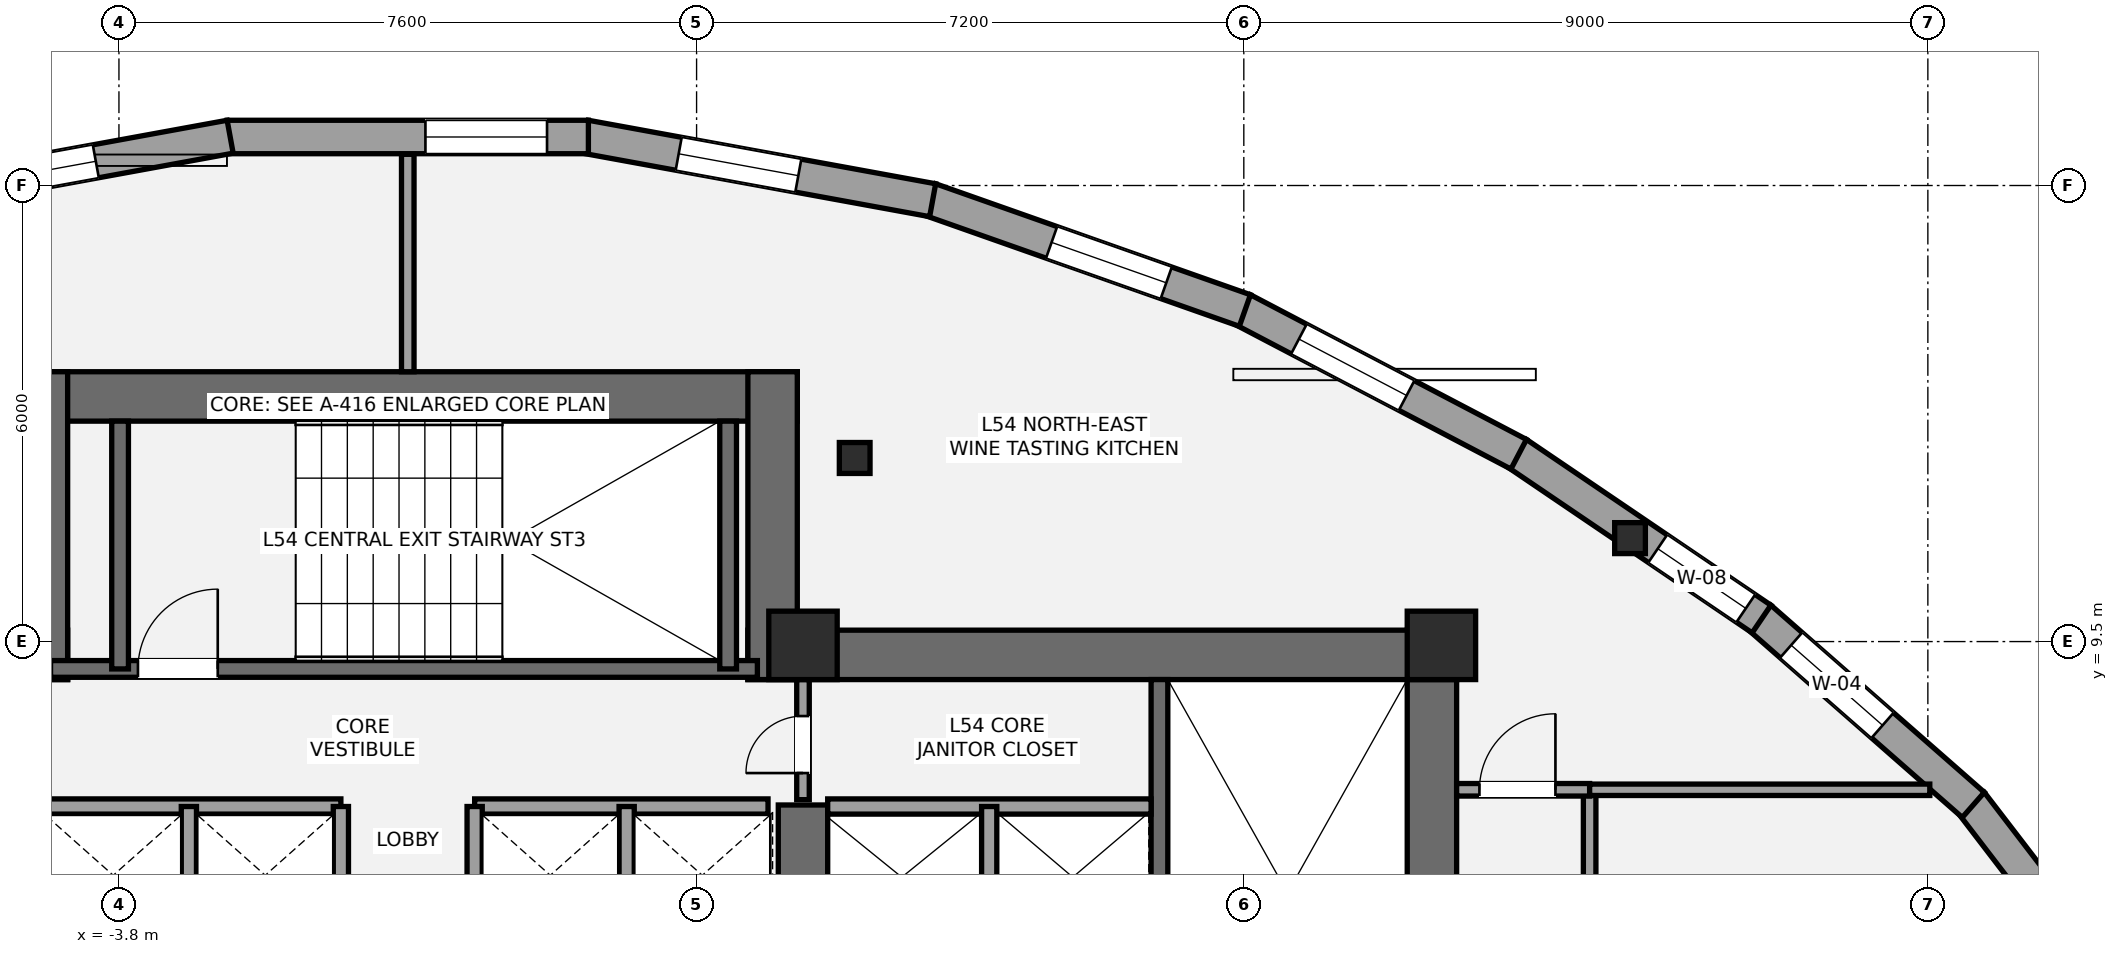
"""IFC4 building model, lengths in metres.
Left out: names, types, materials, properties, quantities, classifications, styles, units other than length and angle.
Written with IfcOpenShell. Run it as: python <this file> out.ifc"""

import sys

from ifc_helpers import new_model, si_unit, direction, frame, frame_2d, origin, origin_2d, place, context, subcontext, project, spatial, rectangle, i_section, extrude, element, fill, save


model = new_model("IFC4")
c1 = context("Model", 3, precision=1e-05, world=origin(), true_north=direction((0.0, 1.0)))
c2 = subcontext(c1, "Body", "Model", "MODEL_VIEW")
j1 = project(units=[si_unit("LENGTHUNIT", "METRE"), si_unit("PLANEANGLEUNIT", "RADIAN")], contexts=[c1])
p1 = place(None, origin())
s1 = spatial("IfcSite", under=j1, at=p1, CompositionType="ELEMENT")
p2 = place(p1, origin())
s2 = spatial("IfcBuilding", under=s1, at=p2, CompositionType="ELEMENT")
p3 = place(p2, frame((0.0, 0.0, 195.0)))
s3 = spatial("IfcBuildingStorey", under=s2, at=p3, CompositionType="ELEMENT", Elevation=195.0)
p4 = place(p3, frame((-13.8, 9.325, 0.0), z_axis=(0.0, 0.0, 1.0), x_axis=(1.0, 0.0, 0.0)))
e1 = element("IfcWall", 1, at=p4, inside=s3, PredefinedType="SHEAR", context=c2, shape_type="SweptSolid", body=[
    extrude(rectangle(XDim=9.325, YDim=0.65, at=frame_2d((4.663, 0.0))), origin(), (0.0, 0.0, 1.0), 3.2),
])
p5 = place(p3, frame((13.475, 1.2, 0.0), z_axis=(0.0, 0.0, 1.0), x_axis=(0.0, 1.0, 0.0)))
e2 = element("IfcWall", 2, at=p5, inside=s3, PredefinedType="SHEAR", context=c2, shape_type="SweptSolid", body=[
    extrude(rectangle(XDim=8.45, YDim=0.65, at=frame_2d((4.225, 0.0))), origin(), (0.0, 0.0, 1.0), 3.2),
])
p6 = place(p3, frame((4.475, 9.325, 0.0), z_axis=(0.0, 0.0, 1.0), x_axis=(1.0, 0.0, 0.0)))
e3 = element("IfcWall", 3, at=p6, inside=s3, PredefinedType="SHEAR", context=c2, shape_type="SweptSolid", body=[
    extrude(rectangle(XDim=9.325, YDim=0.65, at=frame_2d((4.663, 0.0))), origin(), (0.0, 0.0, 1.0), 3.2),
])
p7 = place(p3, frame((5.2, 5.35, 0.0), z_axis=(0.0, 0.0, 1.0), x_axis=(0.0, 1.0, 0.0)))
e4 = element("IfcWall", 4, at=p7, inside=s3, PredefinedType="SHEAR", context=c2, shape_type="SweptSolid", body=[
    extrude(rectangle(XDim=2.0, YDim=0.65, at=frame_2d((1.0, 0.0))), origin(), (0.0, 0.0, 1.0), 3.2),
])
p8 = place(p3, frame((9.89, 1.85, 0.0), z_axis=(0.0, 0.0, 1.0), x_axis=(0.0, 1.0, 0.0)))
e5 = element("IfcWall", 5, at=p8, inside=s3, PredefinedType="SHEAR", context=c2, shape_type="SweptSolid", body=[
    extrude(rectangle(XDim=7.15, YDim=0.22, at=frame_2d((3.575, 0.0))), origin(), (0.0, 0.0, 1.0), 3.2),
])
p9 = place(p3, frame((-5.125, 12.725, 0.0), z_axis=(0.0, 0.0, 1.0), x_axis=(1.0, 0.0, 0.0)))
e6 = element("IfcWall", 6, at=p9, inside=s3, PredefinedType="SHEAR", context=c2, shape_type="SweptSolid", body=[
    extrude(rectangle(XDim=10.25, YDim=0.65, at=frame_2d((5.125, 0.0))), origin(), (0.0, 0.0, 1.0), 3.2),
])
for number, where, z_axis, x_axis in (
    (7, (-4.8, 9.0, 0.0), (0.0, 0.0, 1.0), (0.0, 1.0, 0.0)),
    (8, (4.8, 9.0, 0.0), (0.0, 0.0, 1.0), (0.0, 1.0, 0.0)),
):
    element("IfcWall", number, at=place(p3, frame(where, z_axis=z_axis, x_axis=x_axis)), inside=s3, PredefinedType="SHEAR", context=c2, shape_type="SweptSolid", body=[
        extrude(rectangle(XDim=4.05, YDim=0.65, at=frame_2d((2.025, 0.0))), origin(), (0.0, 0.0, 1.0), 3.2),
    ])
p10 = place(p3, frame((-4.7, 9.14, 0.0), z_axis=(0.0, 0.0, 1.0), x_axis=(1.0, 0.0, 0.0)))
e9 = element("IfcWall", 9, at=p10, inside=s3, PredefinedType="SHEAR", context=c2, shape_type="SweptSolid", body=[
    extrude(rectangle(XDim=9.3, YDim=0.22, at=frame_2d((4.65, 0.0))), origin(), (0.0, 0.0, 1.0), 3.2),
])
p11 = place(p10, frame((1.15, 0.0, 0.0)))
e10 = element("IfcOpeningElement", 10, at=p11, cuts=e9, PredefinedType="OPENING", context=c2, shape_type="SweptSolid", body=[
    extrude(rectangle(XDim=1.05, YDim=2.15, at=frame_2d((0.525, 1.075))), frame((0.0, 0.12, 0.0), z_axis=(0.0, -1.0, 0.0), x_axis=(1.0, 0.0, 0.0)), (0.0, 0.0, 1.0), 0.24),
])
for number, where, z_axis, x_axis in (
    (11, (-3.785, 9.14, 0.0), (0.0, 0.0, 1.0), (0.0, 1.0, 0.0)),
    (12, (4.215, 9.14, 0.0), (0.0, 0.0, 1.0), (0.0, 1.0, 0.0)),
):
    element("IfcWall", number, at=place(p3, frame(where, z_axis=z_axis, x_axis=x_axis)), inside=s3, PredefinedType="SHEAR", context=c2, shape_type="SweptSolid", body=[
        extrude(rectangle(XDim=3.26, YDim=0.22, at=frame_2d((1.63, 0.0))), origin(), (0.0, 0.0, 1.0), 3.2),
    ])
for number, where, z_axis, x_axis in (
    (13, (5.2, 9.45, 0.0), (0.0, 0.0, 1.0), (1.0, 0.0, 0.0)),
    (14, (13.6, 9.45, 0.0), (0.0, 0.0, 1.0), (1.0, 0.0, 0.0)),
):
    element("IfcColumn", number, at=place(p3, frame(where, z_axis=z_axis, x_axis=x_axis)), inside=s3, PredefinedType="COLUMN", context=c2, shape_type="SweptSolid", body=[
        extrude(rectangle(XDim=0.9, YDim=0.9, at=origin_2d()), origin(), (0.0, 0.0, 1.0), 3.2),
    ])
for number, where, z_axis, x_axis in (
    (15, (16.082, 10.861, 0.0), (0.0, 0.0, 1.0), (1.0, 0.0, 0.0)),
    (16, (5.88, 11.915, 0.0), (0.0, 0.0, 1.0), (1.0, 0.0, 0.0)),
):
    element("IfcColumn", number, at=place(p3, frame(where, z_axis=z_axis, x_axis=x_axis)), inside=s3, PredefinedType="COLUMN", context=c2, shape_type="SweptSolid", body=[
        extrude(i_section(OverallWidth=0.404, OverallDepth=0.407, WebThickness=0.027, FlangeThickness=0.044, at=origin_2d()), origin(), (0.0, 0.0, 1.0), 3.2),
    ])
p12 = place(p3, frame((20.568, 7.383, 0.0), z_axis=(0.0, 0.0, 1.0), x_axis=(0.608586512644, -0.793487527708, 0.0)))
e17 = element("IfcWall", 17, at=p12, inside=s3, PredefinedType="STANDARD", context=c2, shape_type="SweptSolid", body=[
    extrude(rectangle(XDim=3.539, YDim=0.44, at=frame_2d((1.769, 0.0))), origin(), (0.0, 0.0, 1.0), 2.315),
])
p13 = place(p12, frame((1.441, 0.0, 0.58)))
e18 = element("IfcOpeningElement", 18, at=p13, cuts=e17, PredefinedType="OPENING", context=c2, shape_type="SweptSolid", body=[
    extrude(rectangle(XDim=1.6, YDim=1.55, at=frame_2d((0.8, 0.775))), frame((0.0, 0.23, 0.0), z_axis=(0.0, -1.0, 0.0), x_axis=(1.0, 0.0, 0.0)), (0.0, 0.0, 1.0), 0.46),
])
p14 = place(p3, frame((17.79, 9.813, 0.0), z_axis=(0.0, 0.0, 1.0), x_axis=(0.751936480142, -0.65923556475, 0.0)))
e19 = element("IfcWall", 19, at=p14, inside=s3, PredefinedType="STANDARD", context=c2, shape_type="SweptSolid", body=[
    extrude(rectangle(XDim=3.735, YDim=0.44, at=frame_2d((1.867, 0.0))), origin(), (0.0, 0.0, 1.0), 2.315),
])
p15 = place(p14, frame((0.547, 0.0, 0.58)))
e20 = element("IfcOpeningElement", 20, at=p15, cuts=e19, PredefinedType="OPENING", context=c2, shape_type="SweptSolid", body=[
    extrude(rectangle(XDim=1.6, YDim=1.55, at=frame_2d((0.8, 0.775))), frame((0.0, 0.23, 0.0), z_axis=(0.0, -1.0, 0.0), x_axis=(1.0, 0.0, 0.0)), (0.0, 0.0, 1.0), 0.46),
])
p16 = place(p3, frame((14.595, 11.977, 0.0), z_axis=(0.0, 0.0, 1.0), x_axis=(0.827704046296, -0.561164870377, 0.0)))
e21 = element("IfcWall", 21, at=p16, inside=s3, PredefinedType="STANDARD", context=c2, shape_type="SweptSolid", body=[
    extrude(rectangle(XDim=3.885, YDim=0.44, at=frame_2d((1.943, 0.0))), origin(), (0.0, 0.0, 1.0), 2.315),
])
p17 = place(p16, frame((2.236, 0.0, 0.58)))
e22 = element("IfcOpeningElement", 22, at=p17, cuts=e21, PredefinedType="OPENING", context=c2, shape_type="SweptSolid", body=[
    extrude(rectangle(XDim=1.4, YDim=1.55, at=frame_2d((0.7, 0.775))), frame((0.0, 0.23, 0.0), z_axis=(0.0, -1.0, 0.0), x_axis=(1.0, 0.0, 0.0)), (0.0, 0.0, 1.0), 0.46),
])
p18 = place(p3, frame((10.985, 13.868, 0.0), z_axis=(0.0, 0.0, 1.0), x_axis=(0.885676487837, -0.464302874094, 0.0)))
e23 = element("IfcWall", 23, at=p18, inside=s3, PredefinedType="STANDARD", context=c2, shape_type="SweptSolid", body=[
    extrude(rectangle(XDim=4.1, YDim=0.44, at=frame_2d((2.05, 0.0))), origin(), (0.0, 0.0, 1.0), 2.315),
])
p19 = place(p18, frame((0.835, 0.0, 0.58)))
e24 = element("IfcOpeningElement", 24, at=p19, cuts=e23, PredefinedType="OPENING", context=c2, shape_type="SweptSolid", body=[
    extrude(rectangle(XDim=1.6, YDim=1.55, at=frame_2d((0.8, 0.775))), frame((0.0, 0.23, 0.0), z_axis=(0.0, -1.0, 0.0), x_axis=(1.0, 0.0, 0.0)), (0.0, 0.0, 1.0), 0.46),
])
p20 = place(p3, frame((6.873, 15.315, 0.0), z_axis=(0.0, 0.0, 1.0), x_axis=(0.943100102185, -0.332508943125, 0.0)))
e25 = element("IfcWall", 25, at=p20, inside=s3, PredefinedType="STANDARD", context=c2, shape_type="SweptSolid", body=[
    extrude(rectangle(XDim=4.391, YDim=0.44, at=frame_2d((2.196, 0.0))), origin(), (0.0, 0.0, 1.0), 2.315),
])
p21 = place(p20, frame((1.695, 0.0, 0.58)))
e26 = element("IfcOpeningElement", 26, at=p21, cuts=e25, PredefinedType="OPENING", context=c2, shape_type="SweptSolid", body=[
    extrude(rectangle(XDim=1.6, YDim=1.55, at=frame_2d((0.8, 0.775))), frame((0.0, 0.23, 0.0), z_axis=(0.0, -1.0, 0.0), x_axis=(1.0, 0.0, 0.0)), (0.0, 0.0, 1.0), 0.46),
])
p22 = place(p3, frame((2.337, 16.142, 0.0), z_axis=(0.0, 0.0, 1.0), x_axis=(0.983691132349, -0.179865939348, 0.0)))
e27 = element("IfcWall", 27, at=p22, inside=s3, PredefinedType="STANDARD", context=c2, shape_type="SweptSolid", body=[
    extrude(rectangle(XDim=4.645, YDim=0.44, at=frame_2d((2.322, 0.0))), origin(), (0.0, 0.0, 1.0), 2.315),
])
p23 = place(p22, frame((1.248, 0.0, 0.58)))
e28 = element("IfcOpeningElement", 28, at=p23, cuts=e27, PredefinedType="OPENING", context=c2, shape_type="SweptSolid", body=[
    extrude(rectangle(XDim=1.6, YDim=1.55, at=frame_2d((0.8, 0.775))), frame((0.0, 0.23, 0.0), z_axis=(0.0, -1.0, 0.0), x_axis=(1.0, 0.0, 0.0)), (0.0, 0.0, 1.0), 0.46),
])
p24 = place(p3, frame((-2.376, 16.138, 0.0), z_axis=(0.0, 0.0, 1.0), x_axis=(1.0, 0.0, 0.0)))
e29 = element("IfcWall", 29, at=p24, inside=s3, PredefinedType="STANDARD", context=c2, shape_type="SweptSolid", body=[
    extrude(rectangle(XDim=4.753, YDim=0.44, at=frame_2d((2.376, 0.0))), origin(), (0.0, 0.0, 1.0), 2.315),
])
p25 = place(p24, frame((2.609, 0.0, 0.58)))
e30 = element("IfcOpeningElement", 30, at=p25, cuts=e29, PredefinedType="OPENING", context=c2, shape_type="SweptSolid", body=[
    extrude(rectangle(XDim=1.6, YDim=1.55, at=frame_2d((0.8, 0.775))), frame((0.0, 0.23, 0.0), z_axis=(0.0, -1.0, 0.0), x_axis=(1.0, 0.0, 0.0)), (0.0, 0.0, 1.0), 0.46),
])
p26 = place(p3, frame((-6.906, 15.306, 0.0), z_axis=(0.0, 0.0, 1.0), x_axis=(0.983691132349, 0.179865939348, 0.0)))
e31 = element("IfcWall", 31, at=p26, inside=s3, PredefinedType="STANDARD", context=c2, shape_type="SweptSolid", body=[
    extrude(rectangle(XDim=4.645, YDim=0.44, at=frame_2d((2.322, 0.0))), origin(), (0.0, 0.0, 1.0), 2.315),
])
p27 = place(p26, frame((1.248, 0.0, 0.58)))
e32 = element("IfcOpeningElement", 32, at=p27, cuts=e31, PredefinedType="OPENING", context=c2, shape_type="SweptSolid", body=[
    extrude(rectangle(XDim=1.6, YDim=1.55, at=frame_2d((0.8, 0.775))), frame((0.0, 0.23, 0.0), z_axis=(0.0, -1.0, 0.0), x_axis=(1.0, 0.0, 0.0)), (0.0, 0.0, 1.0), 0.46),
])
p28 = place(p3, frame((5.525, 7.33, 0.0), z_axis=(0.0, 0.0, 1.0), x_axis=(1.0, 0.0, 0.0)))
e33 = element("IfcWall", 33, at=p28, inside=s3, PredefinedType="SOLIDWALL", context=c2, shape_type="SweptSolid", body=[
    extrude(rectangle(XDim=4.255, YDim=0.2, at=frame_2d((2.127, 0.0))), origin(), (0.0, 0.0, 1.0), 3.02),
])
p29 = place(p3, frame((7.65, 5.47, 0.0), z_axis=(0.0, 0.0, 1.0), x_axis=(0.0, 1.0, 0.0)))
e34 = element("IfcWall", 34, at=p29, inside=s3, PredefinedType="SOLIDWALL", context=c2, shape_type="SweptSolid", body=[
    extrude(rectangle(XDim=1.86, YDim=0.2, at=frame_2d((0.93, 0.0))), origin(), (0.0, 0.0, 1.0), 3.02),
])
for number, where, z_axis, x_axis in (
    (35, (-4.74, 7.33, 0.0), (0.0, 0.0, 1.0), (1.0, 0.0, 0.0)),
    (36, (0.88, 7.33, 0.0), (0.0, 0.0, 1.0), (1.0, 0.0, 0.0)),
):
    element("IfcWall", number, at=place(p3, frame(where, z_axis=z_axis, x_axis=x_axis)), inside=s3, PredefinedType="SOLIDWALL", context=c2, shape_type="SweptSolid", body=[
        extrude(rectangle(XDim=3.86, YDim=0.2, at=frame_2d((1.93, 0.0))), origin(), (0.0, 0.0, 1.0), 3.02),
    ])
for number, where, z_axis, x_axis in (
    (37, (-2.88, 5.52, 0.0), (0.0, 0.0, 1.0), (0.0, 1.0, 0.0)),
    (38, (2.88, 5.52, 0.0), (0.0, 0.0, 1.0), (0.0, 1.0, 0.0)),
    (39, (-0.88, 5.52, 0.0), (0.0, 0.0, 1.0), (0.0, 1.0, 0.0)),
    (40, (0.88, 5.52, 0.0), (0.0, 0.0, 1.0), (0.0, 1.0, 0.0)),
):
    element("IfcWall", number, at=place(p3, frame(where, z_axis=z_axis, x_axis=x_axis)), inside=s3, PredefinedType="SOLIDWALL", context=c2, shape_type="SweptSolid", body=[
        extrude(rectangle(XDim=1.81, YDim=0.2, at=frame_2d((0.905, 0.0))), origin(), (0.0, 0.0, 1.0), 3.02),
    ])
p30 = place(p3, frame((5.2, 7.42, 0.0), z_axis=(0.0, 0.0, 1.0), x_axis=(0.0, 1.0, 0.0)))
e41 = element("IfcWall", 41, at=p30, inside=s3, PredefinedType="PARTITIONING", context=c2, shape_type="SweptSolid", body=[
    extrude(rectangle(XDim=1.58, YDim=0.165, at=frame_2d((0.79, 0.0))), origin(), (0.0, 0.0, 1.0), 3.02),
])
p31 = place(p30, frame((0.35, 0.0, 0.0)))
e42 = element("IfcOpeningElement", 42, at=p31, cuts=e41, PredefinedType="OPENING", context=c2, shape_type="SweptSolid", body=[
    extrude(rectangle(XDim=0.75, YDim=2.1, at=frame_2d((0.375, 1.05))), frame((0.0, 0.093, 0.0), z_axis=(0.0, -1.0, 0.0), x_axis=(1.0, 0.0, 0.0)), (0.0, 0.0, 1.0), 0.185),
])
p32 = place(p3, frame((15.55, -11.054, 0.0), z_axis=(0.0, 0.0, 1.0), x_axis=(0.0, 1.0, 0.0)))
e43 = element("IfcWall", 43, at=p32, inside=s3, PredefinedType="PARTITIONING", context=c2, shape_type="SweptSolid", body=[
    extrude(rectangle(XDim=18.604, YDim=0.165, at=frame_2d((9.302, 0.0))), origin(), (0.0, 0.0, 1.0), 2.473),
])
p33 = place(p32, frame((2.104, 0.0, 0.0)))
e44 = element("IfcOpeningElement", 44, at=p33, cuts=e43, PredefinedType="OPENING", context=c2, shape_type="SweptSolid", body=[
    extrude(rectangle(XDim=0.85, YDim=2.1, at=frame_2d((0.425, 1.05))), frame((0.0, 0.093, 0.0), z_axis=(0.0, -1.0, 0.0), x_axis=(1.0, 0.0, 0.0)), (0.0, 0.0, 1.0), 0.185),
])
p34 = place(p32, frame((5.314, 0.0, 0.0)))
e45 = element("IfcOpeningElement", 45, at=p34, cuts=e43, PredefinedType="OPENING", context=c2, shape_type="SweptSolid", body=[
    extrude(rectangle(XDim=1.0, YDim=2.15, at=frame_2d((0.5, 1.075))), frame((0.0, 0.093, 0.0), z_axis=(0.0, -1.0, 0.0), x_axis=(1.0, 0.0, 0.0)), (0.0, 0.0, 1.0), 0.185),
])
p35 = place(p32, frame((11.455, 0.0, 0.0)))
e46 = element("IfcOpeningElement", 46, at=p35, cuts=e43, PredefinedType="OPENING", context=c2, shape_type="SweptSolid", body=[
    extrude(rectangle(XDim=1.0, YDim=2.15, at=frame_2d((0.5, 1.075))), frame((0.0, 0.093, 0.0), z_axis=(0.0, -1.0, 0.0), x_axis=(1.0, 0.0, 0.0)), (0.0, 0.0, 1.0), 0.185),
])
p36 = place(p32, frame((15.83, 0.0, 0.0)))
e47 = element("IfcOpeningElement", 47, at=p36, cuts=e43, PredefinedType="OPENING", context=c2, shape_type="SweptSolid", body=[
    extrude(rectangle(XDim=1.0, YDim=2.15, at=frame_2d((0.5, 1.075))), frame((0.0, 0.093, 0.0), z_axis=(0.0, -1.0, 0.0), x_axis=(1.0, 0.0, 0.0)), (0.0, 0.0, 1.0), 0.185),
])
p37 = place(p3, frame((13.8, 7.55, 0.0), z_axis=(0.0, 0.0, 1.0), x_axis=(1.0, 0.0, 0.0)))
e48 = element("IfcWall", 48, at=p37, inside=s3, PredefinedType="PARTITIONING", context=c2, shape_type="SweptSolid", body=[
    extrude(rectangle(XDim=1.75, YDim=0.165, at=frame_2d((0.875, 0.0))), origin(), (0.0, 0.0, 1.0), 3.02),
])
p38 = place(p37, frame((0.3, 0.0, 0.0)))
e49 = element("IfcOpeningElement", 49, at=p38, cuts=e48, PredefinedType="OPENING", context=c2, shape_type="SweptSolid", body=[
    extrude(rectangle(XDim=1.0, YDim=2.15, at=frame_2d((0.5, 1.075))), frame((0.0, 0.093, 0.0), z_axis=(0.0, -1.0, 0.0), x_axis=(1.0, 0.0, 0.0)), (0.0, 0.0, 1.0), 0.185),
])
p39 = place(p3, frame((15.55, 7.55, 0.0), z_axis=(0.0, 0.0, 1.0), x_axis=(1.0, 0.0, 0.0)))
e50 = element("IfcWall", 50, at=p39, inside=s3, PredefinedType="PLUMBINGWALL", context=c2, shape_type="SweptSolid", body=[
    extrude(rectangle(XDim=4.475, YDim=0.15, at=frame_2d((2.238, 0.0))), origin(), (0.0, 0.0, 1.0), 2.473),
])
p40 = place(p3, frame((0.0, 13.05, 0.0), z_axis=(0.0, 0.0, 1.0), x_axis=(0.0, 1.0, 0.0)))
e51 = element("IfcWall", 51, at=p40, inside=s3, PredefinedType="PARTITIONING", context=c2, shape_type="SweptSolid", body=[
    extrude(rectangle(XDim=2.86, YDim=0.165, at=frame_2d((1.43, 0.0))), origin(), (0.0, 0.0, 1.0), 3.02),
])
p41 = place(p15, origin())
e52 = element("IfcWindow", 52, at=p41, inside=s3, PartitioningType="SINGLE_PANEL", PredefinedType="WINDOW", context=c2, shape_type="SweptSolid", body=[
    extrude(rectangle(XDim=1.6, YDim=1.55, at=frame_2d((0.8, 0.775))), frame((0.0, -0.01, 0.0), z_axis=(0.0, -1.0, 0.0), x_axis=(1.0, 0.0, 0.0)), (0.0, 0.0, 1.0), 0.06),
])
fill(e20, e52)
p42 = place(p17, origin())
e53 = element("IfcWindow", 53, at=p42, inside=s3, PartitioningType="SINGLE_PANEL", PredefinedType="WINDOW", context=c2, shape_type="SweptSolid", body=[
    extrude(rectangle(XDim=1.4, YDim=1.55, at=frame_2d((0.7, 0.775))), frame((0.0, -0.01, 0.0), z_axis=(0.0, -1.0, 0.0), x_axis=(1.0, 0.0, 0.0)), (0.0, 0.0, 1.0), 0.06),
])
fill(e22, e53)
p43 = place(p19, origin())
e54 = element("IfcWindow", 54, at=p43, inside=s3, PartitioningType="SINGLE_PANEL", PredefinedType="WINDOW", context=c2, shape_type="SweptSolid", body=[
    extrude(rectangle(XDim=1.6, YDim=1.55, at=frame_2d((0.8, 0.775))), frame((0.0, -0.01, 0.0), z_axis=(0.0, -1.0, 0.0), x_axis=(1.0, 0.0, 0.0)), (0.0, 0.0, 1.0), 0.06),
])
fill(e24, e54)
p44 = place(p21, origin())
e55 = element("IfcWindow", 55, at=p44, inside=s3, PartitioningType="SINGLE_PANEL", PredefinedType="WINDOW", context=c2, shape_type="SweptSolid", body=[
    extrude(rectangle(XDim=1.6, YDim=1.55, at=frame_2d((0.8, 0.775))), frame((0.0, -0.01, 0.0), z_axis=(0.0, -1.0, 0.0), x_axis=(1.0, 0.0, 0.0)), (0.0, 0.0, 1.0), 0.06),
])
fill(e26, e55)
p45 = place(p23, origin())
e56 = element("IfcWindow", 56, at=p45, inside=s3, PartitioningType="SINGLE_PANEL", PredefinedType="WINDOW", context=c2, shape_type="SweptSolid", body=[
    extrude(rectangle(XDim=1.6, YDim=1.55, at=frame_2d((0.8, 0.775))), frame((0.0, -0.01, 0.0), z_axis=(0.0, -1.0, 0.0), x_axis=(1.0, 0.0, 0.0)), (0.0, 0.0, 1.0), 0.06),
])
fill(e28, e56)
p46 = place(p25, origin())
e57 = element("IfcWindow", 57, at=p46, inside=s3, PartitioningType="SINGLE_PANEL", PredefinedType="WINDOW", context=c2, shape_type="SweptSolid", body=[
    extrude(rectangle(XDim=1.6, YDim=1.55, at=frame_2d((0.8, 0.775))), frame((0.0, -0.01, 0.0), z_axis=(0.0, -1.0, 0.0), x_axis=(1.0, 0.0, 0.0)), (0.0, 0.0, 1.0), 0.06),
])
fill(e30, e57)
p47 = place(p27, origin())
e58 = element("IfcWindow", 58, at=p47, inside=s3, PartitioningType="SINGLE_PANEL", PredefinedType="WINDOW", context=c2, shape_type="SweptSolid", body=[
    extrude(rectangle(XDim=1.6, YDim=1.55, at=frame_2d((0.8, 0.775))), frame((0.0, -0.01, 0.0), z_axis=(0.0, -1.0, 0.0), x_axis=(1.0, 0.0, 0.0)), (0.0, 0.0, 1.0), 0.06),
])
fill(e32, e58)
p48 = place(p11, origin())
e59 = element("IfcDoor", 59, at=p48, inside=s3, OperationType="SINGLE_SWING_RIGHT", PredefinedType="DOOR", context=c2, shape_type="SweptSolid", body=[
    extrude(rectangle(XDim=1.05, YDim=2.15, at=frame_2d((0.525, 1.075))), frame((0.0, 0.025, 0.0), z_axis=(0.0, -1.0, 0.0), x_axis=(1.0, 0.0, 0.0)), (0.0, 0.0, 1.0), 0.05),
])
fill(e10, e59)
p49 = place(p31, origin())
e60 = element("IfcDoor", 60, at=p49, inside=s3, OperationType="SINGLE_SWING_LEFT", PredefinedType="DOOR", context=c2, shape_type="SweptSolid", body=[
    extrude(rectangle(XDim=0.75, YDim=2.1, at=frame_2d((0.375, 1.05))), frame((0.0, 0.025, 0.0), z_axis=(0.0, -1.0, 0.0), x_axis=(1.0, 0.0, 0.0)), (0.0, 0.0, 1.0), 0.05),
])
fill(e42, e60)
p50 = place(p38, origin())
e61 = element("IfcDoor", 61, at=p50, inside=s3, OperationType="SINGLE_SWING_RIGHT", PredefinedType="DOOR", context=c2, shape_type="SweptSolid", body=[
    extrude(rectangle(XDim=1.0, YDim=2.15, at=frame_2d((0.5, 1.075))), frame((0.0, 0.025, 0.0), z_axis=(0.0, -1.0, 0.0), x_axis=(1.0, 0.0, 0.0)), (0.0, 0.0, 1.0), 0.05),
])
fill(e49, e61)
save(model, sys.argv[1])
